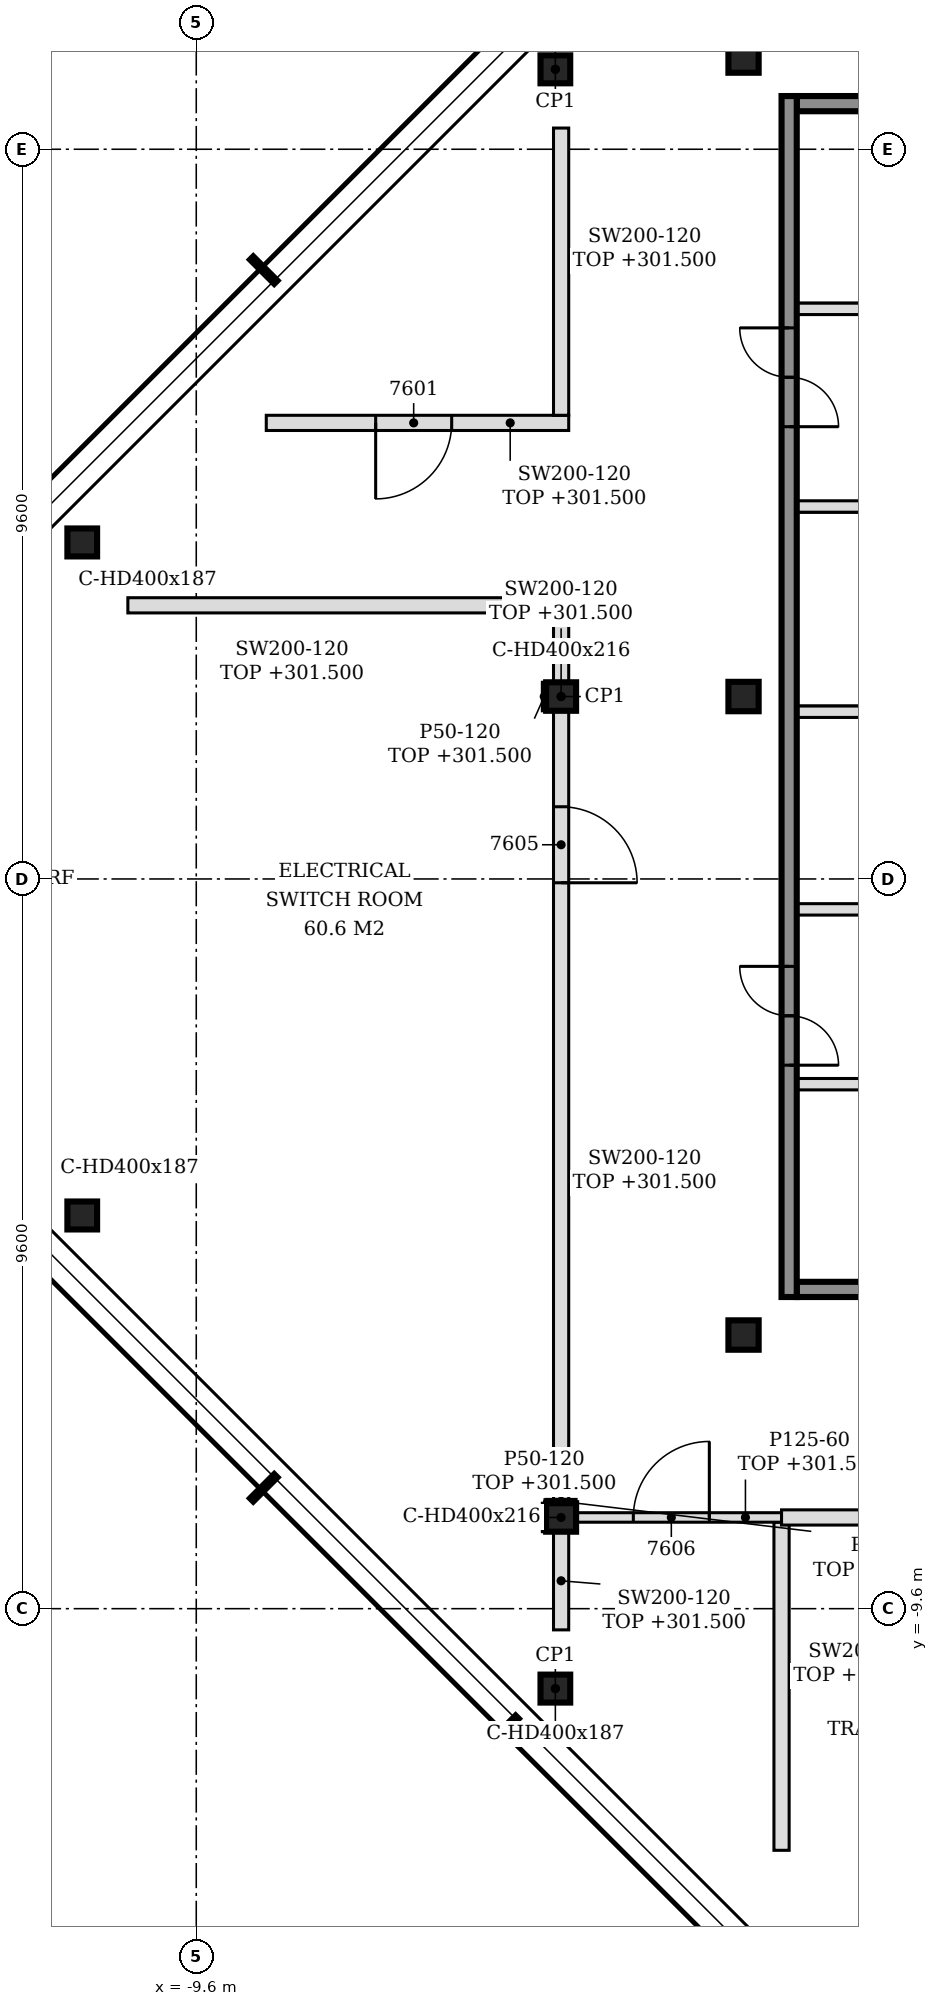
"""IFC4 building model, lengths in metres.
Left out: names, types, materials, properties, quantities, classifications, styles, units other than length and angle.
Written with IfcOpenShell. Run it as: python <this file> out.ifc"""

import sys

from ifc_helpers import new_model, si_unit, direction, frame, frame_2d, origin, origin_2d, place, context, subcontext, project, spatial, rectangle, hollow_rectangle, i_section, extrude, element, fill, save


model = new_model("IFC4")
c1 = context("Model", 3, precision=1e-05, world=origin(), true_north=direction((0.0, 1.0)))
c2 = subcontext(c1, "Body", "Model", "MODEL_VIEW")
j1 = project(units=[si_unit("LENGTHUNIT", "METRE"), si_unit("PLANEANGLEUNIT", "RADIAN")], contexts=[c1])
p1 = place(None, origin())
s1 = spatial("IfcSite", under=j1, at=p1, CompositionType="ELEMENT")
p2 = place(p1, origin())
s2 = spatial("IfcBuilding", under=s1, at=p2, CompositionType="ELEMENT")
p3 = place(p2, frame((0.0, 0.0, 295.8)))
s3 = spatial("IfcBuildingStorey", under=s2, at=p3, CompositionType="ELEMENT", Elevation=295.8)
for number, where, z_axis, x_axis in (
    (1, (-4.876, 10.652, 5.7), (0.0, 0.0, 1.0), (1.0, 0.0, 0.0)),
    (2, (-4.876, -10.652, 5.7), (0.0, 0.0, 1.0), (1.0, 0.0, 0.0)),
):
    element("IfcColumn", number, at=place(p3, frame(where, z_axis=z_axis, x_axis=x_axis)), inside=s3, PredefinedType="COLUMN", context=c2, shape_type="SweptSolid", body=[
        extrude(hollow_rectangle(XDim=0.3, YDim=0.3, WallThickness=0.016, InnerFilletRadius=0.016, OuterFilletRadius=0.024, at=origin_2d()), origin(), (0.0, 0.0, 1.0), 1.838),
    ])
p4 = place(p3, frame((-4.8, 2.4, 5.7), z_axis=(0.0, 0.0, 1.0), x_axis=(1.0, 0.0, 0.0)))
e3 = element("IfcColumn", 3, at=p4, inside=s3, PredefinedType="COLUMN", context=c2, shape_type="SweptSolid", body=[
    extrude(hollow_rectangle(XDim=0.3, YDim=0.3, WallThickness=0.016, InnerFilletRadius=0.016, OuterFilletRadius=0.024, at=origin_2d()), origin(), (0.0, 0.0, 1.0), 1.868),
])
for number, where, z_axis, x_axis in (
    (4, (-4.876, 10.652, -0.2), (0.0, 0.0, 1.0), (1.0, 0.0, 0.0)),
    (5, (-11.1, 4.427, -0.2), (0.0, 0.0, 1.0), (1.0, 0.0, 0.0)),
    (6, (-11.1, -4.427, -0.2), (0.0, 0.0, 1.0), (1.0, 0.0, 0.0)),
    (7, (-4.876, -10.652, -0.2), (0.0, 0.0, 1.0), (1.0, 0.0, 0.0)),
):
    element("IfcColumn", number, at=place(p3, frame(where, z_axis=z_axis, x_axis=x_axis)), inside=s3, PredefinedType="COLUMN", context=c2, shape_type="SweptSolid", body=[
        extrude(i_section(OverallWidth=0.391, OverallDepth=0.368, WebThickness=0.015, FlangeThickness=0.024, FilletRadius=0.015, at=origin_2d()), origin(), (0.0, 0.0, 1.0), 5.9),
    ])
for number, where, z_axis, x_axis in (
    (8, (-4.8, -8.4, -0.2), (0.0, 0.0, 1.0), (1.0, 0.0, 0.0)),
    (9, (-4.8, 2.4, -0.2), (0.0, 0.0, 1.0), (1.0, 0.0, 0.0)),
):
    element("IfcColumn", number, at=place(p3, frame(where, z_axis=z_axis, x_axis=x_axis)), inside=s3, PredefinedType="COLUMN", context=c2, shape_type="SweptSolid", body=[
        extrude(i_section(OverallWidth=0.394, OverallDepth=0.375, WebThickness=0.017, FlangeThickness=0.028, FilletRadius=0.015, at=origin_2d()), origin(), (0.0, 0.0, 1.0), 5.9),
    ])
for number, where, z_axis, x_axis in (
    (10, (-2.4, -6.0, -0.2), (0.0, 0.0, 1.0), (1.0, 0.0, 0.0)),
    (11, (-2.4, 2.4, -0.2), (0.0, 0.0, 1.0), (1.0, 0.0, 0.0)),
    (12, (-2.4, 10.8, -0.2), (0.0, 0.0, 1.0), (1.0, 0.0, 0.0)),
):
    element("IfcColumn", number, at=place(p3, frame(where, z_axis=z_axis, x_axis=x_axis)), inside=s3, PredefinedType="COLUMN", context=c2, shape_type="SweptSolid", body=[
        extrude(i_section(OverallWidth=0.398, OverallDepth=0.387, WebThickness=0.021, FlangeThickness=0.033, FilletRadius=0.015, at=origin_2d()), origin(), (0.0, 0.0, 1.0), 5.9),
    ])
p5 = place(p3, frame((-1.7, -5.4, 0.0), z_axis=(0.0, 0.0, 1.0), x_axis=(1.0, 0.0, 0.0)))
e13 = element("IfcWall", 13, at=p5, inside=s3, PredefinedType="SOLIDWALL", context=c2, shape_type="SweptSolid", body=[
    extrude(rectangle(XDim=7.9, YDim=0.2, at=frame_2d((3.95, 0.0))), origin(), (0.0, 0.0, 1.0), 5.7),
])
p6 = place(p3, frame((-1.7, -2.7, 0.0), z_axis=(0.0, 0.0, 1.0), x_axis=(1.0, 0.0, 0.0)))
e14 = element("IfcWall", 14, at=p6, inside=s3, PredefinedType="PARTITIONING", context=c2, shape_type="SweptSolid", body=[
    extrude(rectangle(XDim=7.825, YDim=0.15, at=frame_2d((3.913, 0.0))), origin(), (0.0, 0.0, 1.0), 5.7),
])
p7 = place(p6, frame((3.45, 0.0, 0.0)))
e15 = element("IfcOpeningElement", 15, at=p7, cuts=e14, PredefinedType="OPENING", context=c2, shape_type="SweptSolid", body=[
    extrude(rectangle(XDim=0.9, YDim=2.1, at=frame_2d((0.45, 1.05))), frame((0.0, 0.085, 0.0), z_axis=(0.0, -1.0, 0.0), x_axis=(1.0, 0.0, 0.0)), (0.0, 0.0, 1.0), 0.17),
])
p8 = place(p3, frame((-1.7, -0.4, 0.0), z_axis=(0.0, 0.0, 1.0), x_axis=(1.0, 0.0, 0.0)))
e16 = element("IfcWall", 16, at=p8, inside=s3, PredefinedType="PARTITIONING", context=c2, shape_type="SweptSolid", body=[
    extrude(rectangle(XDim=10.825, YDim=0.15, at=frame_2d((5.413, 0.0))), origin(), (0.0, 0.0, 1.0), 5.7),
])
p9 = place(p8, frame((4.95, 0.0, 0.0)))
e17 = element("IfcOpeningElement", 17, at=p9, cuts=e16, PredefinedType="OPENING", context=c2, shape_type="SweptSolid", body=[
    extrude(rectangle(XDim=0.9, YDim=2.1, at=frame_2d((0.45, 1.05))), frame((0.0, 0.085, 0.0), z_axis=(0.0, -1.0, 0.0), x_axis=(1.0, 0.0, 0.0)), (0.0, 0.0, 1.0), 0.17),
])
for number, where, z_axis, x_axis in (
    (18, (-1.7, 2.2, 0.0), (0.0, 0.0, 1.0), (1.0, 0.0, 0.0)),
    (19, (-1.7, 4.9, 0.0), (0.0, 0.0, 1.0), (1.0, 0.0, 0.0)),
):
    element("IfcWall", number, at=place(p3, frame(where, z_axis=z_axis, x_axis=x_axis)), inside=s3, PredefinedType="SOLIDWALL", context=c2, shape_type="SweptSolid", body=[
        extrude(rectangle(XDim=4.9, YDim=0.15, at=frame_2d((2.45, 0.0))), origin(), (0.0, 0.0, 1.0), 5.7),
    ])
p10 = place(p3, frame((-1.7, 7.5, 0.0), z_axis=(0.0, 0.0, 1.0), x_axis=(1.0, 0.0, 0.0)))
e20 = element("IfcWall", 20, at=p10, inside=s3, PredefinedType="SOLIDWALL", context=c2, shape_type="SweptSolid", body=[
    extrude(rectangle(XDim=4.825, YDim=0.15, at=frame_2d((2.413, 0.0))), origin(), (0.0, 0.0, 1.0), 5.7),
])
p11 = place(p3, frame((-1.7, 10.2, 0.0), z_axis=(0.0, 0.0, 1.0), x_axis=(1.0, 0.0, 0.0)))
e21 = element("IfcWall", 21, at=p11, inside=s3, PredefinedType="SOLIDWALL", context=c2, shape_type="SweptSolid", body=[
    extrude(rectangle(XDim=7.9, YDim=0.2, at=frame_2d((3.95, 0.0))), origin(), (0.0, 0.0, 1.0), 5.7),
])
p12 = place(p3, frame((-1.8, -5.5, 0.0), z_axis=(0.0, 0.0, 1.0), x_axis=(0.0, 1.0, 0.0)))
e22 = element("IfcWall", 22, at=p12, inside=s3, PredefinedType="SOLIDWALL", context=c2, shape_type="SweptSolid", body=[
    extrude(rectangle(XDim=15.8, YDim=0.2, at=frame_2d((7.9, 0.0))), origin(), (0.0, 0.0, 1.0), 5.7),
])
p13 = place(p12, frame((3.05, 0.0, 0.0)))
e23 = element("IfcOpeningElement", 23, at=p13, cuts=e22, PredefinedType="OPENING", context=c2, shape_type="SweptSolid", body=[
    extrude(rectangle(XDim=1.3, YDim=2.1, at=frame_2d((0.65, 1.05))), frame((0.0, 0.11, 0.0), z_axis=(0.0, -1.0, 0.0), x_axis=(1.0, 0.0, 0.0)), (0.0, 0.0, 1.0), 0.22),
])
p14 = place(p12, frame((11.45, 0.0, 0.0)))
e24 = element("IfcOpeningElement", 24, at=p14, cuts=e22, PredefinedType="OPENING", context=c2, shape_type="SweptSolid", body=[
    extrude(rectangle(XDim=1.3, YDim=2.1, at=frame_2d((0.65, 1.05))), frame((0.0, 0.11, 0.0), z_axis=(0.0, -1.0, 0.0), x_axis=(1.0, 0.0, 0.0)), (0.0, 0.0, 1.0), 0.22),
])
p15 = place(p3, frame((-1.9, -12.779, 0.0), z_axis=(0.0, 0.0, 1.0), x_axis=(0.0, 1.0, 0.0)))
e25 = element("IfcWall", 25, at=p15, inside=s3, PredefinedType="PARTITIONING", context=c2, shape_type="SweptSolid", body=[
    extrude(rectangle(XDim=4.317, YDim=0.2, at=frame_2d((2.158, 0.0))), origin(), (0.0, 0.0, 1.0), 5.7),
])
p16 = place(p3, frame((-4.8, -9.879, 0.0), z_axis=(0.0, 0.0, 1.0), x_axis=(0.0, 1.0, 0.0)))
e26 = element("IfcWall", 26, at=p16, inside=s3, PredefinedType="PARTITIONING", context=c2, shape_type="SweptSolid", body=[
    extrude(rectangle(XDim=1.292, YDim=0.2, at=frame_2d((0.646, 0.0))), origin(), (0.0, 0.0, 1.0), 5.7),
])
p17 = place(p3, frame((-4.603, -8.4, 0.0), z_axis=(0.0, 0.0, 1.0), x_axis=(1.0, 0.0, 0.0)))
e27 = element("IfcWall", 27, at=p17, inside=s3, PredefinedType="PARTITIONING", context=c2, shape_type="SweptSolid", body=[
    extrude(rectangle(XDim=2.703, YDim=0.125, at=frame_2d((1.352, 0.0))), origin(), (0.0, 0.0, 1.0), 5.7),
])
p18 = place(p17, frame((0.753, 0.0, 0.0)))
e28 = element("IfcOpeningElement", 28, at=p18, cuts=e27, PredefinedType="OPENING", context=c2, shape_type="SweptSolid", body=[
    extrude(rectangle(XDim=1.0, YDim=2.1, at=frame_2d((0.5, 1.05))), frame((0.0, 0.073, 0.0), z_axis=(0.0, -1.0, 0.0), x_axis=(1.0, 0.0, 0.0)), (0.0, 0.0, 1.0), 0.145),
])
p19 = place(p3, frame((-1.9, -8.4, 0.0), z_axis=(0.0, 0.0, 1.0), x_axis=(1.0, 0.0, 0.0)))
e29 = element("IfcWall", 29, at=p19, inside=s3, PredefinedType="PARTITIONING", context=c2, shape_type="SweptSolid", body=[
    extrude(rectangle(XDim=4.4, YDim=0.2, at=frame_2d((2.2, 0.0))), origin(), (0.0, 0.0, 1.0), 5.7),
])
p20 = place(p3, frame((-4.8, -8.212, 0.0), z_axis=(0.0, 0.0, 1.0), x_axis=(0.0, 1.0, 0.0)))
e30 = element("IfcWall", 30, at=p20, inside=s3, PredefinedType="PARTITIONING", context=c2, shape_type="SweptSolid", body=[
    extrude(rectangle(XDim=10.425, YDim=0.2, at=frame_2d((5.212, 0.0))), origin(), (0.0, 0.0, 1.0), 5.7),
])
p21 = place(p20, frame((8.163, 0.0, 0.0)))
e31 = element("IfcOpeningElement", 31, at=p21, cuts=e30, PredefinedType="OPENING", context=c2, shape_type="SweptSolid", body=[
    extrude(rectangle(XDim=1.0, YDim=2.1, at=frame_2d((0.5, 1.05))), frame((0.0, 0.11, 0.0), z_axis=(0.0, -1.0, 0.0), x_axis=(1.0, 0.0, 0.0)), (0.0, 0.0, 1.0), 0.22),
])
p22 = place(p3, frame((-4.8, 2.587, 0.0), z_axis=(0.0, 0.0, 1.0), x_axis=(0.0, 1.0, 0.0)))
e32 = element("IfcWall", 32, at=p22, inside=s3, PredefinedType="PARTITIONING", context=c2, shape_type="SweptSolid", body=[
    extrude(rectangle(XDim=0.913, YDim=0.2, at=frame_2d((0.456, 0.0))), origin(), (0.0, 0.0, 1.0), 5.7),
])
p23 = place(p3, frame((-10.5, 3.6, 0.0), z_axis=(0.0, 0.0, 1.0), x_axis=(1.0, 0.0, 0.0)))
e33 = element("IfcWall", 33, at=p23, inside=s3, PredefinedType="PARTITIONING", context=c2, shape_type="SweptSolid", body=[
    extrude(rectangle(XDim=5.8, YDim=0.2, at=frame_2d((2.9, 0.0))), origin(), (0.0, 0.0, 1.0), 5.7),
])
p24 = place(p3, frame((-8.679, 6.0, 0.0), z_axis=(0.0, 0.0, 1.0), x_axis=(1.0, 0.0, 0.0)))
e34 = element("IfcWall", 34, at=p24, inside=s3, PredefinedType="PARTITIONING", context=c2, shape_type="SweptSolid", body=[
    extrude(rectangle(XDim=3.979, YDim=0.2, at=frame_2d((1.99, 0.0))), origin(), (0.0, 0.0, 1.0), 5.7),
])
p25 = place(p24, frame((1.439, 0.0, 0.0)))
e35 = element("IfcOpeningElement", 35, at=p25, cuts=e34, PredefinedType="OPENING", context=c2, shape_type="SweptSolid", body=[
    extrude(rectangle(XDim=1.0, YDim=2.1, at=frame_2d((0.5, 1.05))), frame((0.0, 0.11, 0.0), z_axis=(0.0, -1.0, 0.0), x_axis=(1.0, 0.0, 0.0)), (0.0, 0.0, 1.0), 0.22),
])
p26 = place(p3, frame((-4.8, 6.1, 0.0), z_axis=(0.0, 0.0, 1.0), x_axis=(0.0, 1.0, 0.0)))
e36 = element("IfcWall", 36, at=p26, inside=s3, PredefinedType="PARTITIONING", context=c2, shape_type="SweptSolid", body=[
    extrude(rectangle(XDim=3.779, YDim=0.2, at=frame_2d((1.889, 0.0))), origin(), (0.0, 0.0, 1.0), 5.7),
])
for number, where, z_axis, x_axis in (
    (37, (-5.022, -8.587, 0.0), (0.0, 0.0, 1.0), (0.0, 1.0, 0.0)),
    (38, (-5.022, 2.212, 0.0), (0.0, 0.0, 1.0), (0.0, 1.0, 0.0)),
):
    element("IfcWall", number, at=place(p3, frame(where, z_axis=z_axis, x_axis=x_axis)), inside=s3, PredefinedType="PARTITIONING", context=c2, shape_type="SweptSolid", body=[
        extrude(rectangle(XDim=0.375, YDim=0.05, at=frame_2d((0.188, 0.0))), origin(), (0.0, 0.0, 1.0), 5.7),
    ])
p27 = place(p3, frame((-4.997, -8.188, 0.0), z_axis=(0.0, 0.0, 1.0), x_axis=(1.0, 0.0, 0.0)))
e39 = element("IfcWall", 39, at=p27, inside=s3, PredefinedType="PARTITIONING", context=c2, shape_type="SweptSolid", body=[
    extrude(rectangle(XDim=0.394, YDim=0.05, at=frame_2d((0.197, 0.0))), origin(), (0.0, 0.0, 1.0), 5.7),
])
p28 = place(p13, origin())
e40 = element("IfcDoor", 40, at=p28, inside=s3, OperationType="DOUBLE_DOOR_SINGLE_SWING", PredefinedType="DOOR", context=c2, shape_type="SweptSolid", body=[
    extrude(rectangle(XDim=1.3, YDim=2.1, at=frame_2d((0.65, 1.05))), frame((0.0, 0.025, 0.0), z_axis=(0.0, -1.0, 0.0), x_axis=(1.0, 0.0, 0.0)), (0.0, 0.0, 1.0), 0.05),
])
fill(e23, e40)
p29 = place(p14, origin())
e41 = element("IfcDoor", 41, at=p29, inside=s3, OperationType="DOUBLE_DOOR_SINGLE_SWING", PredefinedType="DOOR", context=c2, shape_type="SweptSolid", body=[
    extrude(rectangle(XDim=1.3, YDim=2.1, at=frame_2d((0.65, 1.05))), frame((0.0, 0.025, 0.0), z_axis=(0.0, -1.0, 0.0), x_axis=(1.0, 0.0, 0.0)), (0.0, 0.0, 1.0), 0.05),
])
fill(e24, e41)
p30 = place(p25, frame((1.0, 0.0, 0.0), z_axis=(0.0, 0.0, 1.0), x_axis=(-1.0, 0.0, 0.0)))
e42 = element("IfcDoor", 42, at=p30, inside=s3, OperationType="SINGLE_SWING_RIGHT", PredefinedType="DOOR", context=c2, shape_type="SweptSolid", body=[
    extrude(rectangle(XDim=1.0, YDim=2.1, at=frame_2d((0.5, 1.05))), frame((0.0, 0.025, 0.0), z_axis=(0.0, -1.0, 0.0), x_axis=(1.0, 0.0, 0.0)), (0.0, 0.0, 1.0), 0.05),
])
fill(e35, e42)
p31 = place(p21, frame((1.0, 0.0, 0.0), z_axis=(0.0, 0.0, 1.0), x_axis=(-1.0, 0.0, 0.0)))
e43 = element("IfcDoor", 43, at=p31, inside=s3, OperationType="SINGLE_SWING_RIGHT", PredefinedType="DOOR", context=c2, shape_type="SweptSolid", body=[
    extrude(rectangle(XDim=1.0, YDim=2.1, at=frame_2d((0.5, 1.05))), frame((0.0, 0.025, 0.0), z_axis=(0.0, -1.0, 0.0), x_axis=(1.0, 0.0, 0.0)), (0.0, 0.0, 1.0), 0.05),
])
fill(e31, e43)
p32 = place(p18, origin())
e44 = element("IfcDoor", 44, at=p32, inside=s3, OperationType="SINGLE_SWING_RIGHT", PredefinedType="DOOR", context=c2, shape_type="SweptSolid", body=[
    extrude(rectangle(XDim=1.0, YDim=2.1, at=frame_2d((0.5, 1.05))), frame((0.0, 0.025, 0.0), z_axis=(0.0, -1.0, 0.0), x_axis=(1.0, 0.0, 0.0)), (0.0, 0.0, 1.0), 0.05),
])
fill(e28, e44)
save(model, sys.argv[1])
